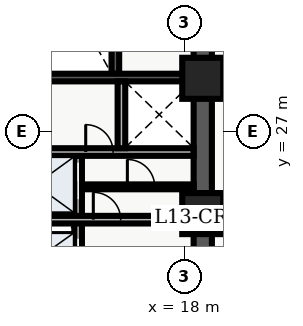
"""IFC4 building model, lengths in metres.
Left out: names, types, materials, properties, quantities, classifications, styles, units other than length and angle.
Written with IfcOpenShell. Run it as: python <this file> out.ifc"""

import sys

from ifc_helpers import new_model, entity, si_unit, converted_unit, direction, frame, origin_with_axes, origin_2d_with_axis, place, context, subcontext, project, spatial, polyline, rectangle, outline, extrude, element, fill, save


model = new_model("IFC4")
c1 = context("Model", 3, precision=1e-05, world=origin_with_axes(), true_north=direction((0.0, 1.0)))
c2 = subcontext(c1, "Body", "Model", "MODEL_VIEW")
j1 = project(units=[si_unit("LENGTHUNIT", "METRE"), converted_unit("PLANEANGLEUNIT", "DEGREE", entity("IfcPlaneAngleMeasure", 0.017), si_unit("PLANEANGLEUNIT", "RADIAN"), dimensions=[0, 0, 0, 0, 0, 0, 0])], contexts=[c1])
p1 = place(None, origin_with_axes())
s1 = spatial("IfcSite", under=j1, at=p1, CompositionType="ELEMENT")
p2 = place(p1, origin_with_axes())
s2 = spatial("IfcBuilding", under=s1, at=p2, CompositionType="ELEMENT")
p3 = place(p2, frame((0.0, 0.0, 56.1), z_axis=(0.0, 0.0, 1.0), x_axis=(1.0, 0.0, 0.0)))
s3 = spatial("IfcBuildingStorey", under=s2, at=p3, CompositionType="ELEMENT", Elevation=56.1)
p4 = place(p3, frame((18.6, 10.8, 0.0), z_axis=(0.0, 0.0, 1.0), x_axis=(0.0, 1.0, 0.0)))
e1 = element("IfcWall", 1, at=p4, inside=s3, PredefinedType="SHEAR", context=c2, shape_type="SweptSolid", body=[
    extrude(outline(polyline([(0.0, -0.3), (13.5, -0.3), (13.5, 0.3), (0.0, 0.3), (0.0, -0.3)])), origin_with_axes(), (0.0, 0.0, 1.0), 3.66),
])
p5 = place(p4, frame((1.3, 0.0, 0.0), z_axis=(0.0, 0.0, 1.0), x_axis=(1.0, 0.0, 0.0)))
e2 = element("IfcOpeningElement", 2, at=p5, cuts=e1, PredefinedType="OPENING", context=c2, shape_type="SweptSolid", body=[
    extrude(rectangle(XDim=1.1, YDim=0.62, at=origin_2d_with_axis()), origin_with_axes(), (0.0, 0.0, 1.0), 2.15),
])
p6 = place(p4, frame((3.4, 0.0, 0.0), z_axis=(0.0, 0.0, 1.0), x_axis=(1.0, 0.0, 0.0)))
e3 = element("IfcOpeningElement", 3, at=p6, cuts=e1, PredefinedType="OPENING", context=c2, shape_type="SweptSolid", body=[
    extrude(rectangle(XDim=1.1, YDim=0.62, at=origin_2d_with_axis()), origin_with_axes(), (0.0, 0.0, 1.0), 2.15),
])
p7 = place(p4, frame((11.125, 0.0, 0.0), z_axis=(0.0, 0.0, 1.0), x_axis=(1.0, 0.0, 0.0)))
e4 = element("IfcOpeningElement", 4, at=p7, cuts=e1, PredefinedType="OPENING", context=c2, shape_type="SweptSolid", body=[
    extrude(rectangle(XDim=1.05, YDim=0.62, at=origin_2d_with_axis()), origin_with_axes(), (0.0, 0.0, 1.0), 2.15),
])
p8 = place(p3, frame((18.6, 24.3, 0.0), z_axis=(0.0, 0.0, 1.0), x_axis=(0.0, 1.0, 0.0)))
e5 = element("IfcWall", 5, at=p8, inside=s3, PredefinedType="SHEAR", context=c2, shape_type="SweptSolid", body=[
    extrude(outline(polyline([(0.0, -0.3), (13.5, -0.3), (13.5, 0.3), (0.0, 0.3), (0.0, -0.3)])), origin_with_axes(), (0.0, 0.0, 1.0), 3.66),
])
p9 = place(p8, frame((6.725, 0.0, 0.0), z_axis=(0.0, 0.0, 1.0), x_axis=(1.0, 0.0, 0.0)))
e6 = element("IfcOpeningElement", 6, at=p9, cuts=e5, PredefinedType="OPENING", context=c2, shape_type="SweptSolid", body=[
    extrude(rectangle(XDim=1.05, YDim=0.62, at=origin_2d_with_axis()), origin_with_axes(), (0.0, 0.0, 1.0), 2.15),
])
p10 = place(p3, frame((15.725, 28.9, 0.0), z_axis=(0.0, 0.0, 1.0), x_axis=(0.0, 1.0, 0.0)))
e7 = element("IfcWall", 7, at=p10, inside=s3, PredefinedType="SHEAR", context=c2, shape_type="SweptSolid", body=[
    extrude(outline(polyline([(0.0, -0.125), (8.6, -0.125), (8.6, 0.125), (0.0, 0.125), (0.0, -0.125)])), origin_with_axes(), (0.0, 0.0, 1.0), 3.66),
])
p11 = place(p3, frame((11.7, 28.775, 0.0), z_axis=(0.0, 0.0, 1.0), x_axis=(1.0, 0.0, 0.0)))
e8 = element("IfcWall", 8, at=p11, inside=s3, PredefinedType="SHEAR", context=c2, shape_type="SweptSolid", body=[
    extrude(outline(polyline([(0.0, -0.125), (6.6, -0.125), (6.6, 0.125), (0.0, 0.125), (0.0, -0.125)])), origin_with_axes(), (0.0, 0.0, 1.0), 3.66),
])
p12 = place(p3, frame((14.5, 19.95, 0.0), z_axis=(0.0, 0.0, 1.0), x_axis=(0.0, 1.0, 0.0)))
e9 = element("IfcWall", 9, at=p12, inside=s3, PredefinedType="SOLIDWALL", context=c2, shape_type="SweptSolid", body=[
    extrude(outline(polyline([(0.0, -0.125), (6.25, -0.125), (6.25, 0.125), (0.0, 0.125), (0.0, -0.125)])), origin_with_axes(), (0.0, 0.0, 1.0), 2.7),
])
p13 = place(p12, frame((1.025, 0.0, 0.0), z_axis=(0.0, 0.0, 1.0), x_axis=(1.0, 0.0, 0.0)))
e10 = element("IfcOpeningElement", 10, at=p13, cuts=e9, PredefinedType="OPENING", context=c2, shape_type="SweptSolid", body=[
    extrude(rectangle(XDim=1.1, YDim=0.27, at=origin_2d_with_axis()), origin_with_axes(), (0.0, 0.0, 1.0), 2.15),
])
p14 = place(p12, frame((2.975, 0.0, 0.0), z_axis=(0.0, 0.0, 1.0), x_axis=(1.0, 0.0, 0.0)))
e11 = element("IfcOpeningElement", 11, at=p14, cuts=e9, PredefinedType="OPENING", context=c2, shape_type="SweptSolid", body=[
    extrude(rectangle(XDim=1.1, YDim=0.27, at=origin_2d_with_axis()), origin_with_axes(), (0.0, 0.0, 1.0), 2.15),
])
p15 = place(p12, frame((5.425, 0.0, 0.0), z_axis=(0.0, 0.0, 1.0), x_axis=(1.0, 0.0, 0.0)))
e12 = element("IfcOpeningElement", 12, at=p15, cuts=e9, PredefinedType="OPENING", context=c2, shape_type="SweptSolid", body=[
    extrude(rectangle(XDim=1.2, YDim=0.27, at=origin_2d_with_axis()), origin_with_axes(), (0.0, 0.0, 1.0), 2.15),
])
p16 = place(p3, frame((11.7, 24.1, 0.0), z_axis=(0.0, 0.0, 1.0), x_axis=(1.0, 0.0, 0.0)))
e13 = element("IfcWall", 13, at=p16, inside=s3, PredefinedType="SOLIDWALL", context=c2, shape_type="SweptSolid", body=[
    extrude(outline(polyline([(0.0, -0.125), (6.6, -0.125), (6.6, 0.125), (0.0, 0.125), (0.0, -0.125)])), origin_with_axes(), (0.0, 0.0, 1.0), 2.7),
])
p17 = place(p16, frame((3.75, 0.0, 0.0), z_axis=(0.0, 0.0, 1.0), x_axis=(1.0, 0.0, 0.0)))
e14 = element("IfcOpeningElement", 14, at=p17, cuts=e13, PredefinedType="OPENING", context=c2, shape_type="SweptSolid", body=[
    extrude(rectangle(XDim=0.9, YDim=0.27, at=origin_2d_with_axis()), origin_with_axes(), (0.0, 0.0, 1.0), 2.15),
])
p18 = place(p3, frame((11.7, 26.325, 0.0), z_axis=(0.0, 0.0, 1.0), x_axis=(1.0, 0.0, 0.0)))
e15 = element("IfcWall", 15, at=p18, inside=s3, PredefinedType="SOLIDWALL", context=c2, shape_type="SweptSolid", body=[
    extrude(outline(polyline([(0.0, -0.125), (6.6, -0.125), (6.6, 0.125), (0.0, 0.125), (0.0, -0.125)])), origin_with_axes(), (0.0, 0.0, 1.0), 2.7),
])
p19 = place(p18, frame((3.5, 0.0, 0.0), z_axis=(0.0, 0.0, 1.0), x_axis=(1.0, 0.0, 0.0)))
e16 = element("IfcOpeningElement", 16, at=p19, cuts=e15, PredefinedType="OPENING", context=c2, shape_type="SweptSolid", body=[
    extrude(rectangle(XDim=0.9, YDim=0.27, at=origin_2d_with_axis()), origin_with_axes(), (0.0, 0.0, 1.0), 2.15),
])
p20 = place(p3, frame((15.925, 26.45, 0.0), z_axis=(0.0, 0.0, 1.0), x_axis=(0.0, 1.0, 0.0)))
e17 = element("IfcWall", 17, at=p20, inside=s3, PredefinedType="SOLIDWALL", context=c2, shape_type="SweptSolid", body=[
    extrude(outline(polyline([(0.0, -0.125), (2.2, -0.125), (2.2, 0.125), (0.0, 0.125), (0.0, -0.125)])), origin_with_axes(), (0.0, 0.0, 1.0), 2.7),
])
for number, where, z_axis, x_axis in (
    (18, (18.6, 24.3, 0.0), (0.0, 0.0, 1.0), (1.0, 0.0, 0.0)),
    (19, (18.6, 28.75, 0.0), (0.0, 0.0, 1.0), (1.0, 0.0, 0.0)),
):
    element("IfcColumn", number, at=place(p3, frame(where, z_axis=z_axis, x_axis=x_axis)), inside=s3, PredefinedType="COLUMN", context=c2, shape_type="SweptSolid", body=[
        extrude(rectangle(XDim=1.35, YDim=1.35, at=origin_2d_with_axis()), origin_with_axes(), (0.0, 0.0, 1.0), 3.9),
    ])
p21 = place(p3, frame((14.62, 25.18, 0.0), z_axis=(0.0, 0.0, 1.0), x_axis=(1.0, 0.0, 0.0)))
e20 = element("IfcWall", 20, at=p21, inside=s3, PredefinedType="PARTITIONING", context=c2, shape_type="SweptSolid", body=[
    extrude(outline(polyline([(0.0, -0.08), (3.68, -0.08), (3.68, 0.08), (0.0, 0.08), (0.0, -0.08)])), origin_with_axes(), (0.0, 0.0, 1.0), 2.7),
])
p22 = place(p21, frame((1.95, 0.0, 0.0), z_axis=(0.0, 0.0, 1.0), x_axis=(1.0, 0.0, 0.0)))
e21 = element("IfcOpeningElement", 21, at=p22, cuts=e20, PredefinedType="OPENING", context=c2, shape_type="SweptSolid", body=[
    extrude(rectangle(XDim=0.9, YDim=0.18, at=origin_2d_with_axis()), origin_with_axes(), (0.0, 0.0, 1.0), 2.15),
])
p23 = place(p12, frame((2.975, 0.0, 0.0), z_axis=(0.0, 0.0, 1.0), x_axis=(1.0, 0.0, 0.0)))
e22 = element("IfcDoor", 22, at=p23, inside=s3, OperationType="SLIDING_TO_RIGHT", PredefinedType="DOOR", context=c2, shape_type="SweptSolid", body=[
    extrude(rectangle(XDim=1.1, YDim=0.09, at=origin_2d_with_axis()), origin_with_axes(), (0.0, 0.0, 1.0), 2.15),
])
fill(e11, e22)
p24 = place(p12, frame((5.425, 0.0, 0.0), z_axis=(0.0, 0.0, 1.0), x_axis=(1.0, 0.0, 0.0)))
e23 = element("IfcDoor", 23, at=p24, inside=s3, OperationType="DOUBLE_DOOR_SLIDING", PredefinedType="DOOR", context=c2, shape_type="SweptSolid", body=[
    extrude(rectangle(XDim=1.2, YDim=0.09, at=origin_2d_with_axis()), origin_with_axes(), (0.0, 0.0, 1.0), 2.15),
])
fill(e12, e23)
p25 = place(p18, frame((3.5, 0.0, 0.0), z_axis=(0.0, 0.0, 1.0), x_axis=(1.0, 0.0, 0.0)))
e24 = element("IfcDoor", 24, at=p25, inside=s3, OperationType="SINGLE_SWING_LEFT", PredefinedType="DOOR", context=c2, shape_type="SweptSolid", body=[
    extrude(rectangle(XDim=0.9, YDim=0.09, at=origin_2d_with_axis()), origin_with_axes(), (0.0, 0.0, 1.0), 2.15),
])
fill(e16, e24)
p26 = place(p16, frame((3.75, 0.0, 0.0), z_axis=(0.0, 0.0, 1.0), x_axis=(1.0, 0.0, 0.0)))
e25 = element("IfcDoor", 25, at=p26, inside=s3, OperationType="SINGLE_SWING_LEFT", PredefinedType="DOOR", context=c2, shape_type="SweptSolid", body=[
    extrude(rectangle(XDim=0.9, YDim=0.09, at=origin_2d_with_axis()), origin_with_axes(), (0.0, 0.0, 1.0), 2.15),
])
fill(e14, e25)
p27 = place(p21, frame((1.95, 0.0, 0.0), z_axis=(0.0, 0.0, 1.0), x_axis=(1.0, 0.0, 0.0)))
e26 = element("IfcDoor", 26, at=p27, inside=s3, OperationType="SINGLE_SWING_LEFT", PredefinedType="DOOR", context=c2, shape_type="SweptSolid", body=[
    extrude(rectangle(XDim=0.9, YDim=0.09, at=origin_2d_with_axis()), origin_with_axes(), (0.0, 0.0, 1.0), 2.15),
])
fill(e21, e26)
save(model, sys.argv[1])
